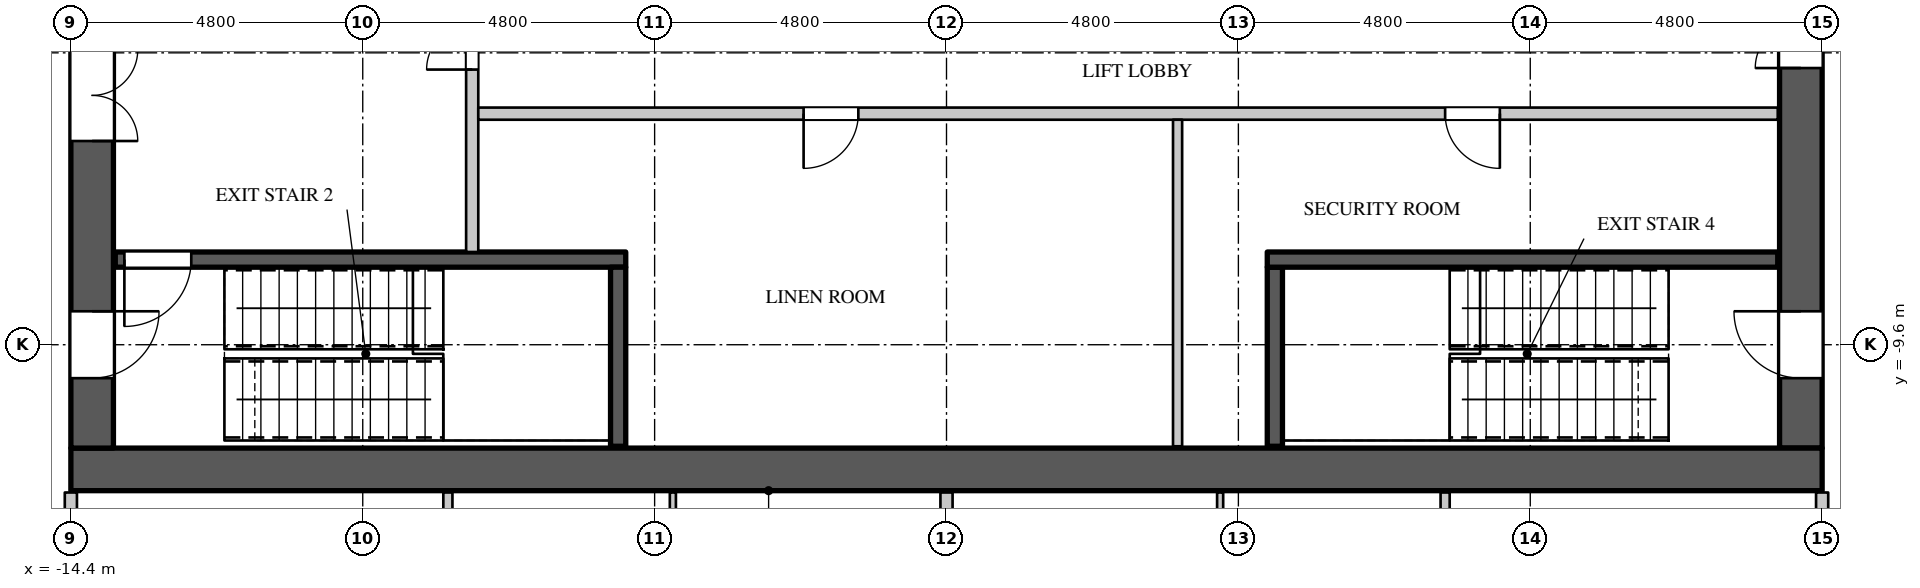
"""IFC4 building model, lengths in metres.
Left out: names, types, materials, properties, quantities, classifications, styles, units other than length and angle.
Written with IfcOpenShell. Run it as: python <this file> out.ifc"""

import sys

from ifc_helpers import new_model, si_unit, direction, frame, frame_2d, origin, place, context, subcontext, project, spatial, rectangle, extrude, element, fill, save


model = new_model("IFC4")
c1 = context("Model", 3, precision=1e-05, world=origin(), true_north=direction((0.0, 1.0)))
c2 = subcontext(c1, "Body", "Model", "MODEL_VIEW")
j1 = project(units=[si_unit("LENGTHUNIT", "METRE"), si_unit("PLANEANGLEUNIT", "RADIAN")], contexts=[c1])
p1 = place(None, origin())
s1 = spatial("IfcSite", under=j1, at=p1, CompositionType="ELEMENT")
p2 = place(p1, origin())
s2 = spatial("IfcBuilding", under=s1, at=p2, CompositionType="ELEMENT")
p3 = place(p2, frame((0.0, 0.0, 187.5)))
s3 = spatial("IfcBuildingStorey", under=s2, at=p3, CompositionType="ELEMENT", Elevation=187.5)
p4 = place(p3, frame((-14.4, -11.65, 0.0), z_axis=(0.0, 0.0, 1.0), x_axis=(1.0, 0.0, 0.0)))
e1 = element("IfcWall", 1, at=p4, inside=s3, PredefinedType="SHEAR", context=c2, shape_type="SweptSolid", body=[
    extrude(rectangle(XDim=28.8, YDim=0.7, at=frame_2d((14.4, 0.0))), origin(), (0.0, 0.0, 1.0), 4.2),
])
p5 = place(p3, frame((14.05, -11.3, 0.0), z_axis=(0.0, 0.0, 1.0), x_axis=(0.0, 1.0, 0.0)))
e2 = element("IfcWall", 2, at=p5, inside=s3, PredefinedType="SHEAR", context=c2, shape_type="SweptSolid", body=[
    extrude(rectangle(XDim=22.6, YDim=0.7, at=frame_2d((11.3, 0.0))), origin(), (0.0, 0.0, 1.0), 4.2),
])
p6 = place(p5, frame((20.35, 0.0, 0.0)))
e3 = element("IfcOpeningElement", 3, at=p6, cuts=e2, PredefinedType="OPENING", context=c2, shape_type="SweptSolid", body=[
    extrude(rectangle(XDim=1.1, YDim=2.2, at=frame_2d((0.55, 1.1))), frame((0.0, 0.36, 0.0), z_axis=(0.0, -1.0, 0.0), x_axis=(1.0, 0.0, 0.0)), (0.0, 0.0, 1.0), 0.72),
])
p7 = place(p5, frame((1.15, 0.0, 0.0)))
e4 = element("IfcOpeningElement", 4, at=p7, cuts=e2, PredefinedType="OPENING", context=c2, shape_type="SweptSolid", body=[
    extrude(rectangle(XDim=1.1, YDim=2.2, at=frame_2d((0.55, 1.1))), frame((0.0, 0.36, 0.0), z_axis=(0.0, -1.0, 0.0), x_axis=(1.0, 0.0, 0.0)), (0.0, 0.0, 1.0), 0.72),
])
p8 = place(p5, frame((14.85, 0.0, 0.0)))
e5 = element("IfcOpeningElement", 5, at=p8, cuts=e2, PredefinedType="OPENING", context=c2, shape_type="SweptSolid", body=[
    extrude(rectangle(XDim=1.5, YDim=2.4, at=frame_2d((0.75, 1.2))), frame((0.0, 0.36, 0.0), z_axis=(0.0, -1.0, 0.0), x_axis=(1.0, 0.0, 0.0)), (0.0, 0.0, 1.0), 0.72),
])
p9 = place(p5, frame((6.25, 0.0, 0.0)))
e6 = element("IfcOpeningElement", 6, at=p9, cuts=e2, PredefinedType="OPENING", context=c2, shape_type="SweptSolid", body=[
    extrude(rectangle(XDim=1.5, YDim=2.4, at=frame_2d((0.75, 1.2))), frame((0.0, 0.36, 0.0), z_axis=(0.0, -1.0, 0.0), x_axis=(1.0, 0.0, 0.0)), (0.0, 0.0, 1.0), 0.72),
])
p10 = place(p3, frame((-14.05, -11.3, 0.0), z_axis=(0.0, 0.0, 1.0), x_axis=(0.0, 1.0, 0.0)))
e7 = element("IfcWall", 7, at=p10, inside=s3, PredefinedType="SHEAR", context=c2, shape_type="SweptSolid", body=[
    extrude(rectangle(XDim=22.6, YDim=0.7, at=frame_2d((11.3, 0.0))), origin(), (0.0, 0.0, 1.0), 4.2),
])
p11 = place(p10, frame((20.35, 0.0, 0.0)))
e8 = element("IfcOpeningElement", 8, at=p11, cuts=e7, PredefinedType="OPENING", context=c2, shape_type="SweptSolid", body=[
    extrude(rectangle(XDim=1.1, YDim=2.2, at=frame_2d((0.55, 1.1))), frame((0.0, 0.36, 0.0), z_axis=(0.0, -1.0, 0.0), x_axis=(1.0, 0.0, 0.0)), (0.0, 0.0, 1.0), 0.72),
])
p12 = place(p10, frame((1.15, 0.0, 0.0)))
e9 = element("IfcOpeningElement", 9, at=p12, cuts=e7, PredefinedType="OPENING", context=c2, shape_type="SweptSolid", body=[
    extrude(rectangle(XDim=1.1, YDim=2.2, at=frame_2d((0.55, 1.1))), frame((0.0, 0.36, 0.0), z_axis=(0.0, -1.0, 0.0), x_axis=(1.0, 0.0, 0.0)), (0.0, 0.0, 1.0), 0.72),
])
p13 = place(p10, frame((16.05, 0.0, 0.0)))
e10 = element("IfcOpeningElement", 10, at=p13, cuts=e7, PredefinedType="OPENING", context=c2, shape_type="SweptSolid", body=[
    extrude(rectangle(XDim=1.5, YDim=2.4, at=frame_2d((0.75, 1.2))), frame((0.0, 0.36, 0.0), z_axis=(0.0, -1.0, 0.0), x_axis=(1.0, 0.0, 0.0)), (0.0, 0.0, 1.0), 0.72),
])
p14 = place(p10, frame((5.05, 0.0, 0.0)))
e11 = element("IfcOpeningElement", 11, at=p14, cuts=e7, PredefinedType="OPENING", context=c2, shape_type="SweptSolid", body=[
    extrude(rectangle(XDim=1.5, YDim=2.4, at=frame_2d((0.75, 1.2))), frame((0.0, 0.36, 0.0), z_axis=(0.0, -1.0, 0.0), x_axis=(1.0, 0.0, 0.0)), (0.0, 0.0, 1.0), 0.72),
])
p15 = place(p3, frame((-14.4, -14.3, 0.0), z_axis=(0.0, 0.0, 1.0), x_axis=(0.0, 1.0, 0.0)))
e12 = element("IfcWall", 12, at=p15, inside=s3, PredefinedType="PARTITIONING", context=c2, shape_type="SweptSolid", body=[
    extrude(rectangle(XDim=2.27, YDim=0.2, at=frame_2d((1.135, 0.0))), origin(), (0.0, 0.0, 1.0), 3.95),
])
p16 = place(p3, frame((-7.8, -8.075, 0.0), z_axis=(0.0, 0.0, 1.0), x_axis=(0.0, 1.0, 0.0)))
e13 = element("IfcWall", 13, at=p16, inside=s3, PredefinedType="PARTITIONING", context=c2, shape_type="SweptSolid", body=[
    extrude(rectangle(XDim=5.275, YDim=0.2, at=frame_2d((2.637, 0.0))), origin(), (0.0, 0.0, 1.0), 3.95),
])
p17 = place(p16, frame((3.0, 0.0, 0.0)))
e14 = element("IfcOpeningElement", 14, at=p17, cuts=e13, PredefinedType="OPENING", context=c2, shape_type="SweptSolid", body=[
    extrude(rectangle(XDim=1.5, YDim=2.4, at=frame_2d((0.75, 1.2))), frame((0.0, 0.11, 0.0), z_axis=(0.0, -1.0, 0.0), x_axis=(1.0, 0.0, 0.0)), (0.0, 0.0, 1.0), 0.22),
])
p18 = place(p3, frame((-7.7, -5.8, 0.0), z_axis=(0.0, 0.0, 1.0), x_axis=(1.0, 0.0, 0.0)))
e15 = element("IfcWall", 15, at=p18, inside=s3, PredefinedType="PARTITIONING", context=c2, shape_type="SweptSolid", body=[
    extrude(rectangle(XDim=21.37, YDim=0.2, at=frame_2d((10.685, 0.0))), origin(), (0.0, 0.0, 1.0), 3.95),
])
p19 = place(p18, frame((5.35, 0.0, 0.0)))
e16 = element("IfcOpeningElement", 16, at=p19, cuts=e15, PredefinedType="OPENING", context=c2, shape_type="SweptSolid", body=[
    extrude(rectangle(XDim=0.9, YDim=2.2, at=frame_2d((0.45, 1.1))), frame((0.0, 0.11, 0.0), z_axis=(0.0, -1.0, 0.0), x_axis=(1.0, 0.0, 0.0)), (0.0, 0.0, 1.0), 0.22),
])
p20 = place(p18, frame((15.9, 0.0, 0.0)))
e17 = element("IfcOpeningElement", 17, at=p20, cuts=e15, PredefinedType="OPENING", context=c2, shape_type="SweptSolid", body=[
    extrude(rectangle(XDim=0.9, YDim=2.2, at=frame_2d((0.45, 1.1))), frame((0.0, 0.11, 0.0), z_axis=(0.0, -1.0, 0.0), x_axis=(1.0, 0.0, 0.0)), (0.0, 0.0, 1.0), 0.22),
])
p21 = place(p3, frame((14.4, -14.3, 0.0), z_axis=(0.0, 0.0, 1.0), x_axis=(0.0, 1.0, 0.0)))
e18 = element("IfcWall", 18, at=p21, inside=s3, PredefinedType="PARTITIONING", context=c2, shape_type="SweptSolid", body=[
    extrude(rectangle(XDim=2.27, YDim=0.2, at=frame_2d((1.135, 0.0))), origin(), (0.0, 0.0, 1.0), 3.95),
])
p22 = place(p3, frame((-8.2, -16.425, 0.0), z_axis=(0.0, 0.0, 1.0), x_axis=(0.0, 1.0, 0.0)))
e19 = element("IfcWall", 19, at=p22, inside=s3, PredefinedType="PARTITIONING", context=c2, shape_type="SweptSolid", body=[
    extrude(rectangle(XDim=4.395, YDim=0.15, at=frame_2d((2.198, 0.0))), origin(), (0.0, 0.0, 1.0), 3.95),
])
p23 = place(p3, frame((3.8, -11.27, 0.0), z_axis=(0.0, 0.0, 1.0), x_axis=(0.0, 1.0, 0.0)))
e20 = element("IfcWall", 20, at=p23, inside=s3, PredefinedType="PARTITIONING", context=c2, shape_type="SweptSolid", body=[
    extrude(rectangle(XDim=5.37, YDim=0.15, at=frame_2d((2.685, 0.0))), origin(), (0.0, 0.0, 1.0), 3.95),
])
p24 = place(p3, frame((8.2, -16.425, 0.0), z_axis=(0.0, 0.0, 1.0), x_axis=(0.0, 1.0, 0.0)))
e21 = element("IfcWall", 21, at=p24, inside=s3, PredefinedType="PARTITIONING", context=c2, shape_type="SweptSolid", body=[
    extrude(rectangle(XDim=4.395, YDim=0.15, at=frame_2d((2.198, 0.0))), origin(), (0.0, 0.0, 1.0), 3.95),
])
p25 = place(p3, frame((0.0, -24.055, 0.0), z_axis=(0.0, 0.0, 1.0), x_axis=(0.0, 1.0, 0.0)))
e22 = element("IfcWall", 22, at=p25, inside=s3, PredefinedType="PARTITIONING", context=c2, shape_type="SweptSolid", body=[
    extrude(rectangle(XDim=12.025, YDim=0.2, at=frame_2d((6.012, 0.0))), origin(), (0.0, 0.0, 1.0), 3.95),
])
p26 = place(p3, frame((-13.67, -8.2, 0.0), z_axis=(0.0, 0.0, 1.0), x_axis=(1.0, 0.0, 0.0)))
e23 = element("IfcWall", 23, at=p26, inside=s3, PredefinedType="SHEAR", context=c2, shape_type="SweptSolid", body=[
    extrude(rectangle(XDim=8.395, YDim=0.25, at=frame_2d((4.198, 0.0))), origin(), (0.0, 0.0, 1.0), 3.95),
])
p27 = place(p26, frame((0.15, 0.0, 0.0)))
e24 = element("IfcOpeningElement", 24, at=p27, cuts=e23, PredefinedType="OPENING", context=c2, shape_type="SweptSolid", body=[
    extrude(rectangle(XDim=1.1, YDim=2.2, at=frame_2d((0.55, 1.1))), frame((0.0, 0.135, 0.0), z_axis=(0.0, -1.0, 0.0), x_axis=(1.0, 0.0, 0.0)), (0.0, 0.0, 1.0), 0.27),
])
for number, where, z_axis, x_axis in (
    (25, (-5.4, -11.27, 0.0), (0.0, 0.0, 1.0), (0.0, 1.0, 0.0)),
    (26, (5.4, -11.27, 0.0), (0.0, 0.0, 1.0), (0.0, 1.0, 0.0)),
):
    element("IfcWall", number, at=place(p3, frame(where, z_axis=z_axis, x_axis=x_axis)), inside=s3, PredefinedType="SHEAR", context=c2, shape_type="SweptSolid", body=[
        extrude(rectangle(XDim=2.945, YDim=0.25, at=frame_2d((1.473, 0.0))), origin(), (0.0, 0.0, 1.0), 3.95),
    ])
p28 = place(p3, frame((5.275, -8.2, 0.0), z_axis=(0.0, 0.0, 1.0), x_axis=(1.0, 0.0, 0.0)))
e27 = element("IfcWall", 27, at=p28, inside=s3, PredefinedType="SHEAR", context=c2, shape_type="SweptSolid", body=[
    extrude(rectangle(XDim=8.395, YDim=0.25, at=frame_2d((4.198, 0.0))), origin(), (0.0, 0.0, 1.0), 3.95),
])
for number, where, z_axis, x_axis in (
    (28, (-4.5, -16.725, 0.0), (0.0, 0.0, 1.0), (0.0, 1.0, 0.0)),
    (29, (4.5, -16.725, 0.0), (0.0, 0.0, 1.0), (0.0, 1.0, 0.0)),
):
    element("IfcWall", number, at=place(p3, frame(where, z_axis=z_axis, x_axis=x_axis)), inside=s3, PredefinedType="PARTITIONING", context=c2, shape_type="SweptSolid", body=[
        extrude(rectangle(XDim=4.695, YDim=0.1, at=frame_2d((2.348, 0.0))), origin(), (0.0, 0.0, 1.0), 3.95),
    ])
p29 = place(p19, origin())
e30 = element("IfcDoor", 30, at=p29, inside=s3, OperationType="SINGLE_SWING_RIGHT", PredefinedType="DOOR", context=c2, shape_type="SweptSolid", body=[
    extrude(rectangle(XDim=0.9, YDim=2.2, at=frame_2d((0.45, 1.1))), frame((0.0, 0.025, 0.0), z_axis=(0.0, -1.0, 0.0), x_axis=(1.0, 0.0, 0.0)), (0.0, 0.0, 1.0), 0.05),
])
fill(e16, e30)
p30 = place(p20, origin())
e31 = element("IfcDoor", 31, at=p30, inside=s3, OperationType="SINGLE_SWING_LEFT", PredefinedType="DOOR", context=c2, shape_type="SweptSolid", body=[
    extrude(rectangle(XDim=0.9, YDim=2.2, at=frame_2d((0.45, 1.1))), frame((0.0, 0.025, 0.0), z_axis=(0.0, -1.0, 0.0), x_axis=(1.0, 0.0, 0.0)), (0.0, 0.0, 1.0), 0.05),
])
fill(e17, e31)
p31 = place(p27, origin())
e32 = element("IfcDoor", 32, at=p31, inside=s3, OperationType="SINGLE_SWING_RIGHT", PredefinedType="DOOR", context=c2, shape_type="SweptSolid", body=[
    extrude(rectangle(XDim=1.1, YDim=2.2, at=frame_2d((0.55, 1.1))), frame((0.0, 0.025, 0.0), z_axis=(0.0, -1.0, 0.0), x_axis=(1.0, 0.0, 0.0)), (0.0, 0.0, 1.0), 0.05),
])
fill(e24, e32)
p32 = place(p17, origin())
e33 = element("IfcDoor", 33, at=p32, inside=s3, OperationType="DOUBLE_DOOR_SINGLE_SWING", PredefinedType="DOOR", context=c2, shape_type="SweptSolid", body=[
    extrude(rectangle(XDim=1.5, YDim=2.4, at=frame_2d((0.75, 1.2))), frame((0.0, 0.025, 0.0), z_axis=(0.0, -1.0, 0.0), x_axis=(1.0, 0.0, 0.0)), (0.0, 0.0, 1.0), 0.05),
])
fill(e14, e33)
p33 = place(p12, origin())
e34 = element("IfcDoor", 34, at=p33, inside=s3, OperationType="SINGLE_SWING_LEFT", PredefinedType="DOOR", context=c2, shape_type="SweptSolid", body=[
    extrude(rectangle(XDim=1.1, YDim=2.2, at=frame_2d((0.55, 1.1))), frame((0.0, -0.295, 0.0), z_axis=(0.0, -1.0, 0.0), x_axis=(1.0, 0.0, 0.0)), (0.0, 0.0, 1.0), 0.05),
])
fill(e9, e34)
p34 = place(p7, origin())
e35 = element("IfcDoor", 35, at=p34, inside=s3, OperationType="SINGLE_SWING_RIGHT", PredefinedType="DOOR", context=c2, shape_type="SweptSolid", body=[
    extrude(rectangle(XDim=1.1, YDim=2.2, at=frame_2d((0.55, 1.1))), frame((0.0, 0.345, 0.0), z_axis=(0.0, -1.0, 0.0), x_axis=(1.0, 0.0, 0.0)), (0.0, 0.0, 1.0), 0.05),
])
fill(e4, e35)
p35 = place(p14, origin())
e36 = element("IfcDoor", 36, at=p35, inside=s3, OperationType="DOUBLE_DOOR_SINGLE_SWING", PredefinedType="DOOR", context=c2, shape_type="SweptSolid", body=[
    extrude(rectangle(XDim=1.5, YDim=2.4, at=frame_2d((0.75, 1.2))), frame((0.0, -0.295, 0.0), z_axis=(0.0, -1.0, 0.0), x_axis=(1.0, 0.0, 0.0)), (0.0, 0.0, 1.0), 0.05),
])
fill(e11, e36)
p36 = place(p9, origin())
e37 = element("IfcDoor", 37, at=p36, inside=s3, OperationType="DOUBLE_DOOR_SINGLE_SWING", PredefinedType="DOOR", context=c2, shape_type="SweptSolid", body=[
    extrude(rectangle(XDim=1.5, YDim=2.4, at=frame_2d((0.75, 1.2))), frame((0.0, 0.345, 0.0), z_axis=(0.0, -1.0, 0.0), x_axis=(1.0, 0.0, 0.0)), (0.0, 0.0, 1.0), 0.05),
])
fill(e6, e37)
save(model, sys.argv[1])
